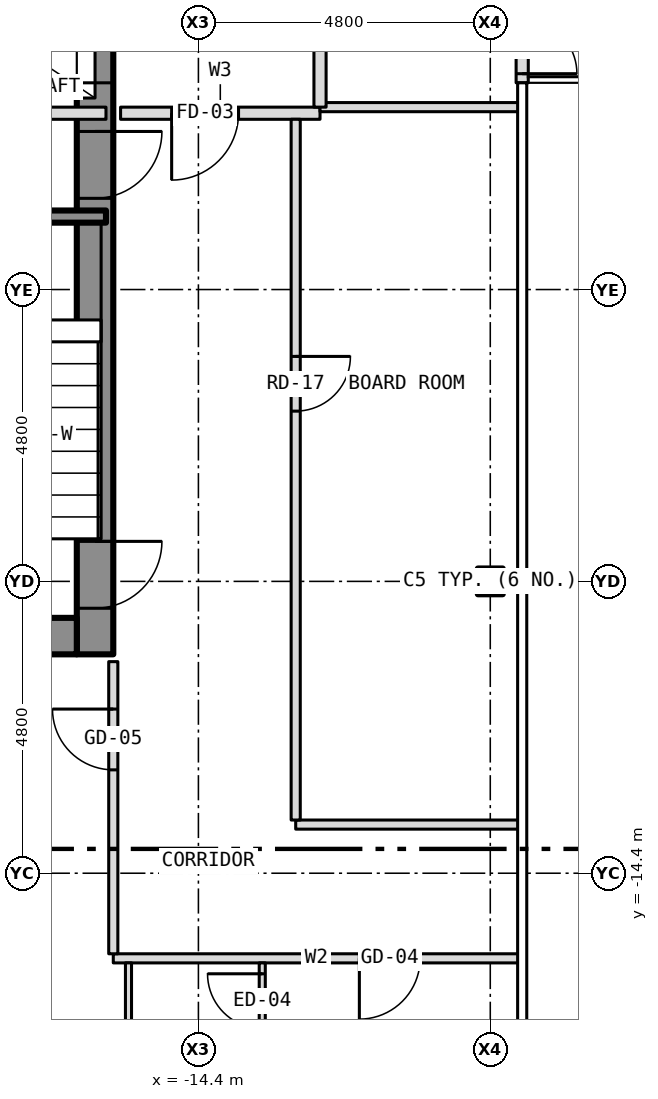
"""IFC4 building model, lengths in metres.
Left out: names, types, materials, properties, quantities, classifications, styles, units other than length and angle.
Written with IfcOpenShell. Run it as: python <this file> out.ifc"""

import sys

from ifc_helpers import new_model, si_unit, direction, frame, frame_2d, origin, origin_2d, place, context, subcontext, project, spatial, rectangle, i_section, extrude, element, fill, save


model = new_model("IFC4")
c1 = context("Model", 3, precision=1e-05, world=origin(), true_north=direction((0.0, 1.0)))
c2 = subcontext(c1, "Body", "Model", "MODEL_VIEW")
j1 = project(units=[si_unit("LENGTHUNIT", "METRE"), si_unit("PLANEANGLEUNIT", "RADIAN")], contexts=[c1])
p1 = place(None, origin())
s1 = spatial("IfcSite", under=j1, at=p1, CompositionType="ELEMENT")
p2 = place(p1, origin())
s2 = spatial("IfcBuilding", under=s1, at=p2, CompositionType="ELEMENT")
p3 = place(p2, frame((0.0, 0.0, 77.5)))
s3 = spatial("IfcBuildingStorey", under=s2, at=p3, CompositionType="ELEMENT", Elevation=77.5)
p4 = place(p3, frame((-9.6, -9.6, -0.15), z_axis=(0.0, 0.0, 1.0), x_axis=(1.0, 0.0, 0.0)))
e1 = element("IfcColumn", 1, at=p4, inside=s3, PredefinedType="COLUMN", context=c2, shape_type="SweptSolid", body=[
    extrude(i_section(OverallWidth=0.409, OverallDepth=0.424, WebThickness=0.033, FlangeThickness=0.052, at=origin_2d()), origin(), (0.0, 0.0, 1.0), 3.5),
])
p5 = place(p3, frame((-16.1, -10.8, 0.0), z_axis=(0.0, 0.0, 1.0), x_axis=(0.0, 1.0, 0.0)))
e2 = element("IfcWall", 2, at=p5, inside=s3, PredefinedType="SHEAR", context=c2, shape_type="SweptSolid", body=[
    extrude(rectangle(XDim=21.6, YDim=0.6, at=frame_2d((10.8, 0.0))), origin(), (0.0, 0.0, 1.0), 3.25),
])
p6 = place(p5, frame((9.4, 0.0, 0.0)))
e3 = element("IfcOpeningElement", 3, at=p6, cuts=e2, PredefinedType="OPENING", context=c2, shape_type="SweptSolid", body=[
    extrude(rectangle(XDim=1.1, YDim=2.1, at=frame_2d((0.55, 1.05))), frame((0.0, 0.312, 0.0), z_axis=(0.0, -1.0, 0.0), x_axis=(1.0, 0.0, 0.0)), (0.0, 0.0, 1.0), 0.624),
])
p7 = place(p5, frame((11.5, 0.0, 0.0)))
e4 = element("IfcOpeningElement", 4, at=p7, cuts=e2, PredefinedType="OPENING", context=c2, shape_type="SweptSolid", body=[
    extrude(rectangle(XDim=1.1, YDim=2.1, at=frame_2d((0.55, 1.05))), frame((0.0, 0.312, 0.0), z_axis=(0.0, -1.0, 0.0), x_axis=(1.0, 0.0, 0.0)), (0.0, 0.0, 1.0), 0.624),
])
p8 = place(p5, frame((13.6, 0.0, 0.0)))
e5 = element("IfcOpeningElement", 5, at=p8, cuts=e2, PredefinedType="OPENING", context=c2, shape_type="SweptSolid", body=[
    extrude(rectangle(XDim=1.1, YDim=2.1, at=frame_2d((0.55, 1.05))), frame((0.0, 0.312, 0.0), z_axis=(0.0, -1.0, 0.0), x_axis=(1.0, 0.0, 0.0)), (0.0, 0.0, 1.0), 0.624),
])
p9 = place(p5, frame((15.7, 0.0, 0.0)))
e6 = element("IfcOpeningElement", 6, at=p9, cuts=e2, PredefinedType="OPENING", context=c2, shape_type="SweptSolid", body=[
    extrude(rectangle(XDim=1.1, YDim=2.1, at=frame_2d((0.55, 1.05))), frame((0.0, 0.312, 0.0), z_axis=(0.0, -1.0, 0.0), x_axis=(1.0, 0.0, 0.0)), (0.0, 0.0, 1.0), 0.624),
])
p10 = place(p5, frame((17.8, 0.0, 0.0)))
e7 = element("IfcOpeningElement", 7, at=p10, cuts=e2, PredefinedType="OPENING", context=c2, shape_type="SweptSolid", body=[
    extrude(rectangle(XDim=1.1, YDim=2.1, at=frame_2d((0.55, 1.05))), frame((0.0, 0.312, 0.0), z_axis=(0.0, -1.0, 0.0), x_axis=(1.0, 0.0, 0.0)), (0.0, 0.0, 1.0), 0.624),
])
p11 = place(p5, frame((0.758, 0.0, 0.0)))
e8 = element("IfcOpeningElement", 8, at=p11, cuts=e2, PredefinedType="OPENING", context=c2, shape_type="SweptSolid", body=[
    extrude(rectangle(XDim=1.1, YDim=2.1, at=frame_2d((0.55, 1.05))), frame((0.0, 0.312, 0.0), z_axis=(0.0, -1.0, 0.0), x_axis=(1.0, 0.0, 0.0)), (0.0, 0.0, 1.0), 0.624),
])
p12 = place(p5, frame((7.5, 0.0, 0.0)))
e9 = element("IfcOpeningElement", 9, at=p12, cuts=e2, PredefinedType="OPENING", context=c2, shape_type="SweptSolid", body=[
    extrude(rectangle(XDim=1.1, YDim=2.1, at=frame_2d((0.55, 1.05))), frame((0.0, 0.312, 0.0), z_axis=(0.0, -1.0, 0.0), x_axis=(1.0, 0.0, 0.0)), (0.0, 0.0, 1.0), 0.624),
])
p13 = place(p3, frame((-23.4, -10.5, 0.0), z_axis=(0.0, 0.0, 1.0), x_axis=(1.0, 0.0, 0.0)))
e10 = element("IfcWall", 10, at=p13, inside=s3, PredefinedType="SHEAR", context=c2, shape_type="SweptSolid", body=[
    extrude(rectangle(XDim=7.0, YDim=0.6, at=frame_2d((3.5, 0.0))), origin(), (0.0, 0.0, 1.0), 3.25),
])
p14 = place(p3, frame((-9.075, -1.4, 0.0), z_axis=(0.0, 0.0, 1.0), x_axis=(0.0, 1.0, 0.0)))
e11 = element("IfcWall", 11, at=p14, inside=s3, PredefinedType="SOLIDWALL", context=c2, shape_type="SweptSolid", body=[
    extrude(rectangle(XDim=2.8, YDim=0.2, at=frame_2d((1.4, 0.0))), origin(), (0.0, 0.0, 1.0), 3.5),
])
p15 = place(p14, frame((0.15, 0.0, 0.0)))
e12 = element("IfcOpeningElement", 12, at=p15, cuts=e11, PredefinedType="OPENING", context=c2, shape_type="SweptSolid", body=[
    extrude(rectangle(XDim=0.9, YDim=2.1, at=frame_2d((0.45, 1.05))), frame((0.0, 0.112, 0.0), z_axis=(0.0, -1.0, 0.0), x_axis=(1.0, 0.0, 0.0)), (0.0, 0.0, 1.0), 0.224),
])
p16 = place(p14, frame((1.75, 0.0, 0.0)))
e13 = element("IfcOpeningElement", 13, at=p16, cuts=e11, PredefinedType="OPENING", context=c2, shape_type="SweptSolid", body=[
    extrude(rectangle(XDim=0.9, YDim=2.1, at=frame_2d((0.45, 1.05))), frame((0.0, 0.112, 0.0), z_axis=(0.0, -1.0, 0.0), x_axis=(1.0, 0.0, 0.0)), (0.0, 0.0, 1.0), 0.224),
])
p17 = place(p3, frame((-15.8, -15.8, 0.0), z_axis=(0.0, 0.0, 1.0), x_axis=(1.0, 0.0, 0.0)))
e14 = element("IfcWall", 14, at=p17, inside=s3, PredefinedType="PARTITIONING", context=c2, shape_type="SweptSolid", body=[
    extrude(rectangle(XDim=6.68, YDim=0.15, at=frame_2d((3.34, 0.0))), origin(), (0.0, 0.0, 1.0), 3.35),
])
p18 = place(p17, frame((4.047, 0.0, 0.0)))
e15 = element("IfcOpeningElement", 15, at=p18, cuts=e14, PredefinedType="OPENING", context=c2, shape_type="SweptSolid", body=[
    extrude(rectangle(XDim=1.0, YDim=2.1, at=frame_2d((0.5, 1.05))), frame((0.0, 0.087, 0.0), z_axis=(0.0, -1.0, 0.0), x_axis=(1.0, 0.0, 0.0)), (0.0, 0.0, 1.0), 0.174),
])
p19 = place(p3, frame((-12.8, -13.6, 0.0), z_axis=(0.0, 0.0, 1.0), x_axis=(1.0, 0.0, 0.0)))
e16 = element("IfcWall", 16, at=p19, inside=s3, PredefinedType="PARTITIONING", context=c2, shape_type="SweptSolid", body=[
    extrude(rectangle(XDim=3.68, YDim=0.15, at=frame_2d((1.84, 0.0))), origin(), (0.0, 0.0, 1.0), 3.35),
])
p20 = place(p3, frame((-20.0, -3.6, 0.0), z_axis=(0.0, 0.0, 1.0), x_axis=(1.0, 0.0, 0.0)))
e17 = element("IfcWall", 17, at=p20, inside=s3, PredefinedType="SHEAR", context=c2, shape_type="SweptSolid", body=[
    extrude(rectangle(XDim=4.08, YDim=0.2, at=frame_2d((2.04, 0.0))), origin(), (0.0, 0.0, 1.0), 3.25),
])
p21 = place(p3, frame((-23.88, -1.9, 0.0), z_axis=(0.0, 0.0, 1.0), x_axis=(1.0, 0.0, 0.0)))
e18 = element("IfcWall", 18, at=p21, inside=s3, PredefinedType="PARTITIONING", context=c2, shape_type="SweptSolid", body=[
    extrude(rectangle(XDim=7.96, YDim=0.2, at=frame_2d((3.98, 0.0))), origin(), (0.0, 0.0, 1.0), 3.25),
])
p22 = place(p21, frame((3.32, 0.0, 0.0)))
e19 = element("IfcOpeningElement", 19, at=p22, cuts=e18, PredefinedType="OPENING", context=c2, shape_type="SweptSolid", body=[
    extrude(rectangle(XDim=0.9, YDim=2.1, at=frame_2d((0.45, 1.05))), frame((0.0, 0.112, 0.0), z_axis=(0.0, -1.0, 0.0), x_axis=(1.0, 0.0, 0.0)), (0.0, 0.0, 1.0), 0.224),
])
p23 = place(p3, frame((-15.68, -1.9, 0.0), z_axis=(0.0, 0.0, 1.0), x_axis=(1.0, 0.0, 0.0)))
e20 = element("IfcWall", 20, at=p23, inside=s3, PredefinedType="PARTITIONING", context=c2, shape_type="SweptSolid", body=[
    extrude(rectangle(XDim=3.28, YDim=0.2, at=frame_2d((1.64, 0.0))), origin(), (0.0, 0.0, 1.0), 3.35),
])
p24 = place(p23, frame((0.84, 0.0, 0.0)))
e21 = element("IfcOpeningElement", 21, at=p24, cuts=e20, PredefinedType="OPENING", context=c2, shape_type="SweptSolid", body=[
    extrude(rectangle(XDim=1.1, YDim=2.1, at=frame_2d((0.55, 1.05))), frame((0.0, 0.112, 0.0), z_axis=(0.0, -1.0, 0.0), x_axis=(1.0, 0.0, 0.0)), (0.0, 0.0, 1.0), 0.224),
])
p25 = place(p3, frame((-12.4, -1.8, 0.0), z_axis=(0.0, 0.0, 1.0), x_axis=(1.0, 0.0, 0.0)))
e22 = element("IfcWall", 22, at=p25, inside=s3, PredefinedType="PARTITIONING", context=c2, shape_type="SweptSolid", body=[
    extrude(rectangle(XDim=3.28, YDim=0.15, at=frame_2d((1.64, 0.0))), origin(), (0.0, 0.0, 1.0), 3.35),
])
p26 = place(p3, frame((-15.8, -15.725, 0.0), z_axis=(0.0, 0.0, 1.0), x_axis=(0.0, 1.0, 0.0)))
e23 = element("IfcWall", 23, at=p26, inside=s3, PredefinedType="PARTITIONING", context=c2, shape_type="SweptSolid", body=[
    extrude(rectangle(XDim=4.805, YDim=0.15, at=frame_2d((2.403, 0.0))), origin(), (0.0, 0.0, 1.0), 3.35),
])
p27 = place(p26, frame((3.025, 0.0, 0.0)))
e24 = element("IfcOpeningElement", 24, at=p27, cuts=e23, PredefinedType="OPENING", context=c2, shape_type="SweptSolid", body=[
    extrude(rectangle(XDim=1.0, YDim=2.1, at=frame_2d((0.5, 1.05))), frame((0.0, 0.087, 0.0), z_axis=(0.0, -1.0, 0.0), x_axis=(1.0, 0.0, 0.0)), (0.0, 0.0, 1.0), 0.174),
])
p28 = place(p3, frame((-15.55, -23.88, 0.0), z_axis=(0.0, 0.0, 1.0), x_axis=(0.0, 1.0, 0.0)))
e25 = element("IfcWall", 25, at=p28, inside=s3, PredefinedType="PARTITIONING", context=c2, shape_type="SweptSolid", body=[
    extrude(rectangle(XDim=8.005, YDim=0.1, at=frame_2d((4.002, 0.0))), origin(), (0.0, 0.0, 1.0), 3.35),
])
p29 = place(p3, frame((-13.35, -18.95, 0.0), z_axis=(0.0, 0.0, 1.0), x_axis=(0.0, 1.0, 0.0)))
e26 = element("IfcWall", 26, at=p29, inside=s3, PredefinedType="PARTITIONING", context=c2, shape_type="SweptSolid", body=[
    extrude(rectangle(XDim=3.075, YDim=0.1, at=frame_2d((1.538, 0.0))), origin(), (0.0, 0.0, 1.0), 3.35),
])
p30 = place(p29, frame((1.996, 0.0, 0.0)))
e27 = element("IfcOpeningElement", 27, at=p30, cuts=e26, PredefinedType="OPENING", context=c2, shape_type="SweptSolid", body=[
    extrude(rectangle(XDim=0.9, YDim=2.1, at=frame_2d((0.45, 1.05))), frame((0.0, 0.062, 0.0), z_axis=(0.0, -1.0, 0.0), x_axis=(1.0, 0.0, 0.0)), (0.0, 0.0, 1.0), 0.124),
])
p31 = place(p3, frame((-12.8, -13.525, 0.0), z_axis=(0.0, 0.0, 1.0), x_axis=(0.0, 1.0, 0.0)))
e28 = element("IfcWall", 28, at=p31, inside=s3, PredefinedType="PARTITIONING", context=c2, shape_type="SweptSolid", body=[
    extrude(rectangle(XDim=11.525, YDim=0.15, at=frame_2d((5.762, 0.0))), origin(), (0.0, 0.0, 1.0), 3.35),
])
p32 = place(p31, frame((6.725, 0.0, 0.0)))
e29 = element("IfcOpeningElement", 29, at=p32, cuts=e28, PredefinedType="OPENING", context=c2, shape_type="SweptSolid", body=[
    extrude(rectangle(XDim=0.9, YDim=2.1, at=frame_2d((0.45, 1.05))), frame((0.0, 0.087, 0.0), z_axis=(0.0, -1.0, 0.0), x_axis=(1.0, 0.0, 0.0)), (0.0, 0.0, 1.0), 0.174),
])
p33 = place(p3, frame((-12.4, -1.8, 0.0), z_axis=(0.0, 0.0, 1.0), x_axis=(0.0, 1.0, 0.0)))
e30 = element("IfcWall", 30, at=p33, inside=s3, PredefinedType="PARTITIONING", context=c2, shape_type="SweptSolid", body=[
    extrude(rectangle(XDim=4.0, YDim=0.2, at=frame_2d((2.0, 0.0))), origin(), (0.0, 0.0, 1.0), 3.35),
])
p34 = place(p33, frame((1.25, 0.0, 0.0)))
e31 = element("IfcOpeningElement", 31, at=p34, cuts=e30, PredefinedType="OPENING", context=c2, shape_type="SweptSolid", body=[
    extrude(rectangle(XDim=1.1, YDim=2.1, at=frame_2d((0.55, 1.05))), frame((0.0, 0.112, 0.0), z_axis=(0.0, -1.0, 0.0), x_axis=(1.0, 0.0, 0.0)), (0.0, 0.0, 1.0), 0.224),
])
p35 = place(p15, origin())
e32 = element("IfcDoor", 32, at=p35, inside=s3, OperationType="SINGLE_SWING_LEFT", PredefinedType="DOOR", context=c2, shape_type="SweptSolid", body=[
    extrude(rectangle(XDim=0.9, YDim=2.1, at=frame_2d((0.45, 1.05))), frame((0.0, 0.025, 0.0), z_axis=(0.0, -1.0, 0.0), x_axis=(1.0, 0.0, 0.0)), (0.0, 0.0, 1.0), 0.05),
])
fill(e12, e32)
p36 = place(p6, origin())
e33 = element("IfcDoor", 33, at=p36, inside=s3, OperationType="SLIDING_TO_LEFT", PredefinedType="DOOR", context=c2, shape_type="SweptSolid", body=[
    extrude(rectangle(XDim=1.1, YDim=2.1, at=frame_2d((0.55, 1.05))), frame((0.0, 0.025, 0.0), z_axis=(0.0, -1.0, 0.0), x_axis=(1.0, 0.0, 0.0)), (0.0, 0.0, 1.0), 0.05),
])
fill(e3, e33)
p37 = place(p11, origin())
e34 = element("IfcDoor", 34, at=p37, inside=s3, OperationType="SINGLE_SWING_RIGHT", PredefinedType="DOOR", context=c2, shape_type="SweptSolid", body=[
    extrude(rectangle(XDim=1.1, YDim=2.1, at=frame_2d((0.55, 1.05))), frame((0.0, 0.025, 0.0), z_axis=(0.0, -1.0, 0.0), x_axis=(1.0, 0.0, 0.0)), (0.0, 0.0, 1.0), 0.05),
])
fill(e8, e34)
p38 = place(p12, origin())
e35 = element("IfcDoor", 35, at=p38, inside=s3, OperationType="SINGLE_SWING_RIGHT", PredefinedType="DOOR", context=c2, shape_type="SweptSolid", body=[
    extrude(rectangle(XDim=1.1, YDim=2.1, at=frame_2d((0.55, 1.05))), frame((0.0, 0.025, 0.0), z_axis=(0.0, -1.0, 0.0), x_axis=(1.0, 0.0, 0.0)), (0.0, 0.0, 1.0), 0.05),
])
fill(e9, e35)
p39 = place(p24, origin())
e36 = element("IfcDoor", 36, at=p39, inside=s3, OperationType="SINGLE_SWING_LEFT", PredefinedType="DOOR", context=c2, shape_type="SweptSolid", body=[
    extrude(rectangle(XDim=1.1, YDim=2.1, at=frame_2d((0.55, 1.05))), frame((0.0, 0.025, 0.0), z_axis=(0.0, -1.0, 0.0), x_axis=(1.0, 0.0, 0.0)), (0.0, 0.0, 1.0), 0.05),
])
fill(e21, e36)
p40 = place(p18, origin())
e37 = element("IfcDoor", 37, at=p40, inside=s3, OperationType="SINGLE_SWING_LEFT", PredefinedType="DOOR", context=c2, shape_type="SweptSolid", body=[
    extrude(rectangle(XDim=1.0, YDim=2.1, at=frame_2d((0.5, 1.05))), frame((0.0, 0.025, 0.0), z_axis=(0.0, -1.0, 0.0), x_axis=(1.0, 0.0, 0.0)), (0.0, 0.0, 1.0), 0.05),
])
fill(e15, e37)
p41 = place(p30, origin())
e38 = element("IfcDoor", 38, at=p41, inside=s3, OperationType="SINGLE_SWING_RIGHT", PredefinedType="DOOR", context=c2, shape_type="SweptSolid", body=[
    extrude(rectangle(XDim=0.9, YDim=2.1, at=frame_2d((0.45, 1.05))), frame((0.0, 0.025, 0.0), z_axis=(0.0, -1.0, 0.0), x_axis=(1.0, 0.0, 0.0)), (0.0, 0.0, 1.0), 0.05),
])
fill(e27, e38)
p42 = place(p27, origin())
e39 = element("IfcDoor", 39, at=p42, inside=s3, OperationType="SINGLE_SWING_RIGHT", PredefinedType="DOOR", context=c2, shape_type="SweptSolid", body=[
    extrude(rectangle(XDim=1.0, YDim=2.1, at=frame_2d((0.5, 1.05))), frame((0.0, 0.025, 0.0), z_axis=(0.0, -1.0, 0.0), x_axis=(1.0, 0.0, 0.0)), (0.0, 0.0, 1.0), 0.05),
])
fill(e24, e39)
p43 = place(p32, origin())
e40 = element("IfcDoor", 40, at=p43, inside=s3, OperationType="SINGLE_SWING_RIGHT", PredefinedType="DOOR", context=c2, shape_type="SweptSolid", body=[
    extrude(rectangle(XDim=0.9, YDim=2.1, at=frame_2d((0.45, 1.05))), frame((0.0, 0.025, 0.0), z_axis=(0.0, -1.0, 0.0), x_axis=(1.0, 0.0, 0.0)), (0.0, 0.0, 1.0), 0.05),
])
fill(e29, e40)
save(model, sys.argv[1])
